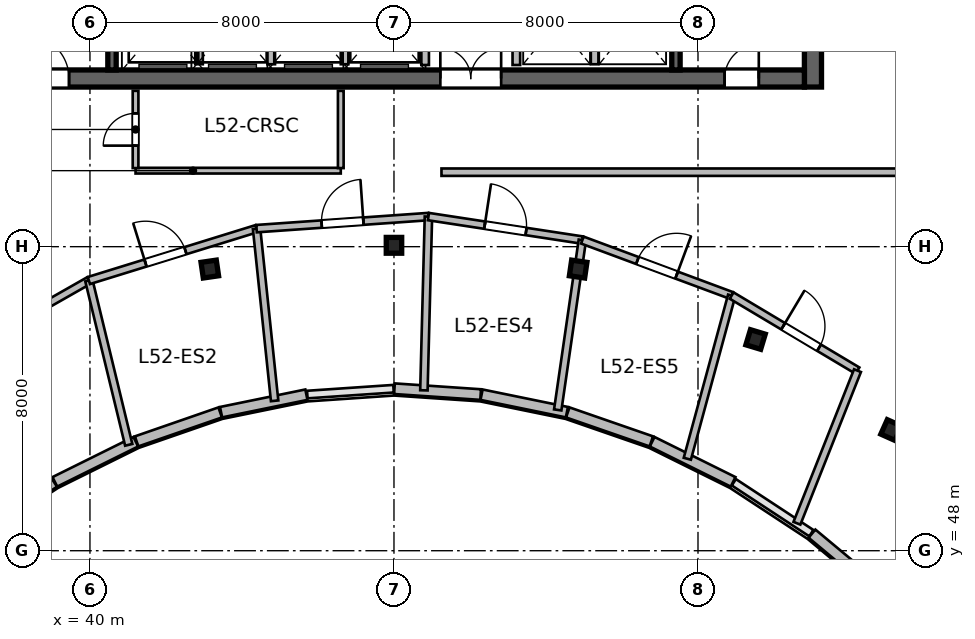
"""IFC4 building model, lengths in metres.
Left out: names, types, materials, properties, quantities, classifications, styles, units other than length and angle.
Written with IfcOpenShell. Run it as: python <this file> out.ifc"""

import sys

from ifc_helpers import new_model, si_unit, direction, frame, frame_2d, origin, origin_2d, place, context, subcontext, project, spatial, rectangle, i_section, extrude, source, transform, mapped, element, fill, save


model = new_model("IFC4")
c1 = context("Model", 3, precision=1e-05, world=origin(), true_north=direction((0.0, 1.0)))
c2 = subcontext(c1, "Body", "Model", "MODEL_VIEW")
j1 = project(units=[si_unit("LENGTHUNIT", "METRE"), si_unit("PLANEANGLEUNIT", "RADIAN")], contexts=[c1])
p1 = place(None, origin())
s1 = spatial("IfcSite", under=j1, at=p1, CompositionType="ELEMENT")
p2 = place(p1, origin())
s2 = spatial("IfcBuilding", under=s1, at=p2, CompositionType="ELEMENT")
p3 = place(p2, frame((0.0, 0.0, 215.7)))
s3 = spatial("IfcBuildingStorey", under=s2, at=p3, CompositionType="ELEMENT", Elevation=215.7)
m1 = source(origin(), c2, "Body", "SweptSolid", [
    extrude(rectangle(XDim=12.0, YDim=0.45, at=frame_2d((6.0, 0.0))), origin(), (0.0, 0.0, 1.0), 3.9),
])
p4 = place(p3, frame((59.025, 60.2, 0.0), z_axis=(0.0, 0.0, 1.0), x_axis=(0.0, 1.0, 0.0)))
e1 = element("IfcWall", 1, at=p4, inside=s3, PredefinedType="SHEAR", context=c2, shape_type="MappedRepresentation", body=[
    mapped(m1, transform((0.0, 0.0, 0.0), scale=1.0)),
])
m2 = source(origin(), c2, "Body", "SweptSolid", [
    extrude(rectangle(XDim=21.6, YDim=0.45, at=frame_2d((10.8, 0.0))), origin(), (0.0, 0.0, 1.0), 3.9),
])
p5 = place(p3, frame((37.2, 60.425, 0.0), z_axis=(0.0, 0.0, 1.0), x_axis=(1.0, 0.0, 0.0)))
e2 = element("IfcWall", 2, at=p5, inside=s3, PredefinedType="SHEAR", context=c2, shape_type="MappedRepresentation", body=[
    mapped(m2, transform((0.0, 0.0, 0.0), scale=1.0)),
])
p6 = place(p5, frame((1.1, 0.0, 0.0)))
e3 = element("IfcOpeningElement", 3, at=p6, cuts=e2, PredefinedType="OPENING", context=c2, shape_type="SweptSolid", body=[
    extrude(rectangle(XDim=1.15, YDim=2.15, at=frame_2d((0.575, 1.075))), frame((0.0, 0.235, 0.0), z_axis=(0.0, -1.0, 0.0), x_axis=(1.0, 0.0, 0.0)), (0.0, 0.0, 1.0), 0.47),
])
p7 = place(p5, frame((19.5, 0.0, 0.0)))
e4 = element("IfcOpeningElement", 4, at=p7, cuts=e2, PredefinedType="OPENING", context=c2, shape_type="SweptSolid", body=[
    extrude(rectangle(XDim=0.9, YDim=2.1, at=frame_2d((0.45, 1.05))), frame((0.0, 0.235, 0.0), z_axis=(0.0, -1.0, 0.0), x_axis=(1.0, 0.0, 0.0)), (0.0, 0.0, 1.0), 0.47),
])
p8 = place(p5, frame((12.02, 0.0, 0.0)))
e5 = element("IfcOpeningElement", 5, at=p8, cuts=e2, PredefinedType="OPENING", context=c2, shape_type="SweptSolid", body=[
    extrude(rectangle(XDim=1.6, YDim=2.15, at=frame_2d((0.8, 1.075))), frame((0.0, 0.235, 0.0), z_axis=(0.0, -1.0, 0.0), x_axis=(1.0, 0.0, 0.0)), (0.0, 0.0, 1.0), 0.47),
])
m3 = source(origin(), c2, "Body", "SweptSolid", [
    extrude(rectangle(XDim=11.1, YDim=0.22, at=frame_2d((5.55, 0.0))), origin(), (0.0, 0.0, 1.0), 3.9),
])
p9 = place(p3, frame((40.58, 60.65, 0.0), z_axis=(0.0, 0.0, 1.0), x_axis=(0.0, 1.0, 0.0)))
e6 = element("IfcWall", 6, at=p9, inside=s3, PredefinedType="SHEAR", context=c2, shape_type="MappedRepresentation", body=[
    mapped(m3, transform((0.0, 0.0, 0.0), scale=1.0)),
])
p10 = place(p3, frame((55.42, 60.65, 0.0), z_axis=(0.0, 0.0, 1.0), x_axis=(0.0, 1.0, 0.0)))
e7 = element("IfcWall", 7, at=p10, inside=s3, PredefinedType="SHEAR", context=c2, shape_type="MappedRepresentation", body=[
    mapped(m3, transform((0.0, 0.0, 0.0), scale=1.0)),
])
p11 = place(p10, frame((9.595, 0.0, 0.0)))
e8 = element("IfcOpeningElement", 8, at=p11, cuts=e7, PredefinedType="OPENING", context=c2, shape_type="SweptSolid", body=[
    extrude(rectangle(XDim=1.15, YDim=2.15, at=frame_2d((0.575, 1.075))), frame((0.0, 0.12, 0.0), z_axis=(0.0, -1.0, 0.0), x_axis=(1.0, 0.0, 0.0)), (0.0, 0.0, 1.0), 0.24),
])
m4 = source(origin(), c2, "Body", "SweptSolid", [
    extrude(i_section(OverallWidth=0.406, OverallDepth=0.416, WebThickness=0.03, FlangeThickness=0.048, at=origin_2d()), origin(), (0.0, 0.0, 1.0), 3.9),
])
for number, where, z_axis, x_axis in (
    (9, (43.154, 55.411, 0.0), (0.0, 0.0, 1.0), (-0.143, 0.99, 0.0)),
    (10, (48.0, 56.036, 0.0), (0.0, 0.0, 1.0), (0.0, 1.0, 0.0)),
    (11, (52.846, 55.411, 0.0), (0.0, 0.0, 1.0), (0.143, 0.99, 0.0)),
    (12, (57.515, 53.558, 0.0), (0.0, 0.0, 1.0), (0.289, 0.957, 0.0)),
    (13, (61.082, 51.175, 0.0), (0.0, 0.0, 1.0), (0.409, 0.912, 0.0)),
):
    element("IfcColumn", number, at=place(p3, frame(where, z_axis=z_axis, x_axis=x_axis)), inside=s3, PredefinedType="COLUMN", context=c2, shape_type="MappedRepresentation", body=[
        mapped(m4, transform((0.0, 0.0, 0.0), scale=1.0)),
    ])
m5 = source(origin(), c2, "Body", "SweptSolid", [
    extrude(rectangle(XDim=2.511, YDim=0.28, at=frame_2d((1.256, 0.0))), origin(), (0.0, 0.0, 1.0), 3.64),
])
p12 = place(p3, frame((60.928, 46.841, 0.0), z_axis=(0.0, 0.0, 1.0), x_axis=(-0.767910416122, 0.640557251782, 0.0)))
e14 = element("IfcWall", 14, at=p12, inside=s3, PredefinedType="SOLIDWALL", context=c2, shape_type="MappedRepresentation", body=[
    mapped(m5, transform((0.0, 0.0, 0.0), scale=1.0)),
])
m6 = source(origin(), c2, "Body", "SweptSolid", [
    extrude(rectangle(XDim=2.378, YDim=0.28, at=frame_2d((1.189, 0.0))), origin(), (0.0, 0.0, 1.0), 3.64),
])
p13 = place(p3, frame((56.924, 49.812, 0.0), z_axis=(0.0, 0.0, 1.0), x_axis=(-0.895941616831, 0.444171835252, 0.0)))
e15 = element("IfcWall", 15, at=p13, inside=s3, PredefinedType="SOLIDWALL", context=c2, shape_type="MappedRepresentation", body=[
    mapped(m6, transform((0.0, 0.0, 0.0), scale=1.0)),
])
m7 = source(origin(), c2, "Body", "SweptSolid", [
    extrude(rectangle(XDim=2.328, YDim=0.28, at=frame_2d((1.164, 0.0))), origin(), (0.0, 0.0, 1.0), 3.64),
])
p14 = place(p3, frame((54.772, 50.876, 0.0), z_axis=(0.0, 0.0, 1.0), x_axis=(-0.944872545641, 0.32743834915, 0.0)))
e16 = element("IfcWall", 16, at=p14, inside=s3, PredefinedType="SOLIDWALL", context=c2, shape_type="MappedRepresentation", body=[
    mapped(m7, transform((0.0, 0.0, 0.0), scale=1.0)),
])
m8 = source(origin(), c2, "Body", "SweptSolid", [
    extrude(rectangle(XDim=2.292, YDim=0.28, at=frame_2d((1.146, 0.0))), origin(), (0.0, 0.0, 1.0), 3.64),
])
p15 = place(p3, frame((52.55, 51.645, 0.0), z_axis=(0.0, 0.0, 1.0), x_axis=(-0.979635482689, 0.200784264963, 0.0)))
e17 = element("IfcWall", 17, at=p15, inside=s3, PredefinedType="SOLIDWALL", context=c2, shape_type="MappedRepresentation", body=[
    mapped(m8, transform((0.0, 0.0, 0.0), scale=1.0)),
])
m9 = source(origin(), c2, "Body", "SweptSolid", [
    extrude(rectangle(XDim=2.274, YDim=0.28, at=frame_2d((1.137, 0.0))), origin(), (0.0, 0.0, 1.0), 3.64),
])
p16 = place(p3, frame((50.281, 52.109, 0.0), z_axis=(0.0, 0.0, 1.0), x_axis=(-0.997702696995, 0.067744582138, 0.0)))
e18 = element("IfcWall", 18, at=p16, inside=s3, PredefinedType="SOLIDWALL", context=c2, shape_type="MappedRepresentation", body=[
    mapped(m9, transform((0.0, 0.0, 0.0), scale=1.0)),
])
p17 = place(p3, frame((45.695, 52.105, 0.0), z_axis=(0.0, 0.0, 1.0), x_axis=(-0.979635482689, -0.200784264963, 0.0)))
e19 = element("IfcWall", 19, at=p17, inside=s3, PredefinedType="SOLIDWALL", context=c2, shape_type="MappedRepresentation", body=[
    mapped(m8, transform((0.0, 0.0, 0.0), scale=1.0)),
])
p18 = place(p3, frame((43.427, 51.639, 0.0), z_axis=(0.0, 0.0, 1.0), x_axis=(-0.944872545641, -0.32743834915, 0.0)))
e20 = element("IfcWall", 20, at=p18, inside=s3, PredefinedType="SOLIDWALL", context=c2, shape_type="MappedRepresentation", body=[
    mapped(m7, transform((0.0, 0.0, 0.0), scale=1.0)),
])
p19 = place(p3, frame((41.207, 50.868, 0.0), z_axis=(0.0, 0.0, 1.0), x_axis=(-0.895941616831, -0.444171835252, 0.0)))
e21 = element("IfcWall", 21, at=p19, inside=s3, PredefinedType="SOLIDWALL", context=c2, shape_type="MappedRepresentation", body=[
    mapped(m6, transform((0.0, 0.0, 0.0), scale=1.0)),
])
m10 = source(origin(), c2, "Body", "SweptSolid", [
    extrude(rectangle(XDim=2.44, YDim=0.28, at=frame_2d((1.22, 0.0))), origin(), (0.0, 0.0, 1.0), 3.64),
])
p20 = place(p3, frame((39.057, 49.801, 0.0), z_axis=(0.0, 0.0, 1.0), x_axis=(-0.83598480459, -0.548752591333, 0.0)))
e22 = element("IfcWall", 22, at=p20, inside=s3, PredefinedType="SOLIDWALL", context=c2, shape_type="MappedRepresentation", body=[
    mapped(m10, transform((0.0, 0.0, 0.0), scale=1.0)),
])
m11 = source(origin(), c2, "Body", "SweptSolid", [
    extrude(rectangle(XDim=2.24, YDim=0.2, at=frame_2d((1.12, 0.0))), origin(), (0.0, 0.0, 1.0), 3.64),
])
for number, where, z_axis, x_axis in (
    (23, (48.82, 60.78, 0.0), (0.0, 0.0, 1.0), (0.0, 1.0, 0.0)),
    (24, (51.22, 60.78, 0.0), (0.0, 0.0, 1.0), (0.0, 1.0, 0.0)),
):
    element("IfcWall", number, at=place(p3, frame(where, z_axis=z_axis, x_axis=x_axis)), inside=s3, PredefinedType="SOLIDWALL", context=c2, shape_type="MappedRepresentation", body=[
        mapped(m11, transform((0.0, 0.0, 0.0), scale=1.0)),
    ])
m12 = source(origin(), c2, "Body", "SweptSolid", [
    extrude(rectangle(XDim=2.2, YDim=0.2, at=frame_2d((1.1, 0.0))), origin(), (0.0, 0.0, 1.0), 3.64),
])
for number, where, z_axis, x_axis in (
    (25, (42.87, 60.8, 0.0), (0.0, 0.0, 1.0), (0.0, 1.0, 0.0)),
    (26, (44.77, 60.8, 0.0), (0.0, 0.0, 1.0), (0.0, 1.0, 0.0)),
    (27, (46.7, 60.8, 0.0), (0.0, 0.0, 1.0), (0.0, 1.0, 0.0)),
    (28, (53.28, 60.8, 0.0), (0.0, 0.0, 1.0), (0.0, 1.0, 0.0)),
):
    element("IfcWall", number, at=place(p3, frame(where, z_axis=z_axis, x_axis=x_axis)), inside=s3, PredefinedType="SOLIDWALL", context=c2, shape_type="MappedRepresentation", body=[
        mapped(m12, transform((0.0, 0.0, 0.0), scale=1.0)),
    ])
m13 = source(origin(), c2, "Body", "SweptSolid", [
    extrude(rectangle(XDim=5.4, YDim=0.15, at=frame_2d((2.7, 0.0))), origin(), (0.0, 0.0, 1.0), 3.64),
])
p21 = place(p3, frame((41.2, 58.0, 0.0), z_axis=(0.0, 0.0, 1.0), x_axis=(1.0, 0.0, 0.0)))
e29 = element("IfcWall", 29, at=p21, inside=s3, PredefinedType="PARTITIONING", context=c2, shape_type="MappedRepresentation", body=[
    mapped(m13, transform((0.0, 0.0, 0.0), scale=1.0)),
])
m14 = source(origin(), c2, "Body", "SweptSolid", [
    extrude(rectangle(XDim=2.033, YDim=0.15, at=frame_2d((1.016, 0.0))), origin(), (0.0, 0.0, 1.0), 3.64),
])
p22 = place(p3, frame((41.2, 58.067, 0.0), z_axis=(0.0, 0.0, 1.0), x_axis=(0.0, 1.0, 0.0)))
e30 = element("IfcWall", 30, at=p22, inside=s3, PredefinedType="PARTITIONING", context=c2, shape_type="MappedRepresentation", body=[
    mapped(m14, transform((0.0, 0.0, 0.0), scale=1.0)),
])
p23 = place(p22, frame((0.591, 0.0, 0.0)))
e31 = element("IfcOpeningElement", 31, at=p23, cuts=e30, PredefinedType="OPENING", context=c2, shape_type="SweptSolid", body=[
    extrude(rectangle(XDim=0.85, YDim=2.1, at=frame_2d((0.425, 1.05))), frame((0.0, 0.085, 0.0), z_axis=(0.0, -1.0, 0.0), x_axis=(1.0, 0.0, 0.0)), (0.0, 0.0, 1.0), 0.17),
])
p24 = place(p3, frame((46.6, 58.067, 0.0), z_axis=(0.0, 0.0, 1.0), x_axis=(0.0, 1.0, 0.0)))
e32 = element("IfcWall", 32, at=p24, inside=s3, PredefinedType="PARTITIONING", context=c2, shape_type="MappedRepresentation", body=[
    mapped(m14, transform((0.0, 0.0, 0.0), scale=1.0)),
])
m15 = source(origin(), c2, "Body", "SweptSolid", [
    extrude(rectangle(XDim=4.796, YDim=0.195, at=frame_2d((2.398, 0.0))), origin(), (0.0, 0.0, 1.0), 3.64),
])
p25 = place(p3, frame((35.803, 52.738, 0.0), z_axis=(0.0, 0.0, 1.0), x_axis=(0.869231352707, 0.494405557686, 0.0)))
e33 = element("IfcWall", 33, at=p25, inside=s3, PredefinedType="PARTITIONING", context=c2, shape_type="MappedRepresentation", body=[
    mapped(m15, transform((0.0, 0.0, 0.0), scale=1.0)),
])
p26 = place(p25, frame((1.098, 0.0, 0.0)))
e34 = element("IfcOpeningElement", 34, at=p26, cuts=e33, PredefinedType="OPENING", context=c2, shape_type="SweptSolid", body=[
    extrude(rectangle(XDim=1.1, YDim=2.15, at=frame_2d((0.55, 1.075))), frame((0.0, 0.107, 0.0), z_axis=(0.0, -1.0, 0.0), x_axis=(1.0, 0.0, 0.0)), (0.0, 0.0, 1.0), 0.215),
])
m16 = source(origin(), c2, "Body", "SweptSolid", [
    extrude(rectangle(XDim=4.448, YDim=0.195, at=frame_2d((2.224, 0.0))), origin(), (0.0, 0.0, 1.0), 3.64),
])
p27 = place(p3, frame((41.02, 50.786, 0.0), z_axis=(0.0, 0.0, 1.0), x_axis=(-0.235672283469, 0.971832585791, 0.0)))
e35 = element("IfcWall", 35, at=p27, inside=s3, PredefinedType="PARTITIONING", context=c2, shape_type="MappedRepresentation", body=[
    mapped(m16, transform((0.0, 0.0, 0.0), scale=1.0)),
])
m17 = source(origin(), c2, "Body", "SweptSolid", [
    extrude(rectangle(XDim=4.619, YDim=0.195, at=frame_2d((2.31, 0.0))), origin(), (0.0, 0.0, 1.0), 3.64),
])
p28 = place(p3, frame((39.972, 55.109, 0.0), z_axis=(0.0, 0.0, 1.0), x_axis=(0.955335644135, 0.295522938274, 0.0)))
e36 = element("IfcWall", 36, at=p28, inside=s3, PredefinedType="PARTITIONING", context=c2, shape_type="MappedRepresentation", body=[
    mapped(m17, transform((0.0, 0.0, 0.0), scale=1.0)),
])
p29 = place(p28, frame((1.56, 0.0, 0.0)))
e37 = element("IfcOpeningElement", 37, at=p29, cuts=e36, PredefinedType="OPENING", context=c2, shape_type="SweptSolid", body=[
    extrude(rectangle(XDim=1.1, YDim=2.15, at=frame_2d((0.55, 1.075))), frame((0.0, 0.107, 0.0), z_axis=(0.0, -1.0, 0.0), x_axis=(1.0, 0.0, 0.0)), (0.0, 0.0, 1.0), 0.215),
])
m18 = source(origin(), c2, "Body", "SweptSolid", [
    extrude(rectangle(XDim=4.555, YDim=0.195, at=frame_2d((2.278, 0.0))), origin(), (0.0, 0.0, 1.0), 3.64),
])
p30 = place(p3, frame((44.859, 51.944, 0.0), z_axis=(0.0, 0.0, 1.0), x_axis=(-0.104299759329, 0.994545906534, 0.0)))
e38 = element("IfcWall", 38, at=p30, inside=s3, PredefinedType="PARTITIONING", context=c2, shape_type="MappedRepresentation", body=[
    mapped(m18, transform((0.0, 0.0, 0.0), scale=1.0)),
])
m19 = source(origin(), c2, "Body", "SweptSolid", [
    extrude(rectangle(XDim=4.534, YDim=0.195, at=frame_2d((2.267, 0.0))), origin(), (0.0, 0.0, 1.0), 3.64),
])
p31 = place(p3, frame((44.384, 56.474, 0.0), z_axis=(0.0, 0.0, 1.0), x_axis=(0.997542735031, 0.070060629361, 0.0)))
e39 = element("IfcWall", 39, at=p31, inside=s3, PredefinedType="PARTITIONING", context=c2, shape_type="MappedRepresentation", body=[
    mapped(m19, transform((0.0, 0.0, 0.0), scale=1.0)),
])
p32 = place(p31, frame((1.717, 0.0, 0.0)))
e40 = element("IfcOpeningElement", 40, at=p32, cuts=e39, PredefinedType="OPENING", context=c2, shape_type="SweptSolid", body=[
    extrude(rectangle(XDim=1.1, YDim=2.15, at=frame_2d((0.55, 1.075))), frame((0.0, 0.107, 0.0), z_axis=(0.0, -1.0, 0.0), x_axis=(1.0, 0.0, 0.0)), (0.0, 0.0, 1.0), 0.215),
])
m20 = source(origin(), c2, "Body", "SweptSolid", [
    extrude(rectangle(XDim=4.573, YDim=0.195, at=frame_2d((2.287, 0.0))), origin(), (0.0, 0.0, 1.0), 3.64),
])
p33 = place(p3, frame((48.788, 52.22, 0.0), z_axis=(0.0, 0.0, 1.0), x_axis=(0.026049788838, 0.99966064667, 0.0)))
e41 = element("IfcWall", 41, at=p33, inside=s3, PredefinedType="PARTITIONING", context=c2, shape_type="MappedRepresentation", body=[
    mapped(m20, transform((0.0, 0.0, 0.0), scale=1.0)),
])
m21 = source(origin(), c2, "Body", "SweptSolid", [
    extrude(rectangle(XDim=4.097, YDim=0.195, at=frame_2d((2.049, 0.0))), origin(), (0.0, 0.0, 1.0), 3.64),
])
p34 = place(p3, frame((48.907, 56.792, 0.0), z_axis=(0.0, 0.0, 1.0), x_axis=(0.988545320847, -0.150924314249, 0.0)))
e42 = element("IfcWall", 42, at=p34, inside=s3, PredefinedType="PARTITIONING", context=c2, shape_type="MappedRepresentation", body=[
    mapped(m21, transform((0.0, 0.0, 0.0), scale=1.0)),
])
p35 = place(p34, frame((1.499, 0.0, 0.0)))
e43 = element("IfcOpeningElement", 43, at=p35, cuts=e42, PredefinedType="OPENING", context=c2, shape_type="SweptSolid", body=[
    extrude(rectangle(XDim=1.1, YDim=2.15, at=frame_2d((0.55, 1.075))), frame((0.0, 0.107, 0.0), z_axis=(0.0, -1.0, 0.0), x_axis=(1.0, 0.0, 0.0)), (0.0, 0.0, 1.0), 0.215),
])
m22 = source(origin(), c2, "Body", "SweptSolid", [
    extrude(rectangle(XDim=4.516, YDim=0.195, at=frame_2d((2.258, 0.0))), origin(), (0.0, 0.0, 1.0), 3.085),
])
p36 = place(p3, frame((52.309, 51.705, 0.0), z_axis=(0.0, 0.0, 1.0), x_axis=(0.143540347267, 0.989644465809, 0.0)))
e44 = element("IfcWall", 44, at=p36, inside=s3, PredefinedType="PARTITIONING", context=c2, shape_type="MappedRepresentation", body=[
    mapped(m22, transform((0.0, 0.0, 0.0), scale=1.0)),
])
m23 = source(origin(), c2, "Body", "SweptSolid", [
    extrude(rectangle(XDim=4.191, YDim=0.195, at=frame_2d((2.095, 0.0))), origin(), (0.0, 0.0, 1.0), 3.64),
])
p37 = place(p3, frame((52.957, 56.174, 0.0), z_axis=(0.0, 0.0, 1.0), x_axis=(0.937361695407, -0.348357649527, 0.0)))
e45 = element("IfcWall", 45, at=p37, inside=s3, PredefinedType="PARTITIONING", context=c2, shape_type="MappedRepresentation", body=[
    mapped(m23, transform((0.0, 0.0, 0.0), scale=1.0)),
])
p38 = place(p37, frame((1.545, 0.0, 0.0)))
e46 = element("IfcOpeningElement", 46, at=p38, cuts=e45, PredefinedType="OPENING", context=c2, shape_type="SweptSolid", body=[
    extrude(rectangle(XDim=1.1, YDim=2.15, at=frame_2d((0.55, 1.075))), frame((0.0, 0.107, 0.0), z_axis=(0.0, -1.0, 0.0), x_axis=(1.0, 0.0, 0.0)), (0.0, 0.0, 1.0), 0.215),
])
m24 = source(origin(), c2, "Body", "SweptSolid", [
    extrude(rectangle(XDim=4.449, YDim=0.195, at=frame_2d((2.225, 0.0))), origin(), (0.0, 0.0, 1.0), 3.64),
])
p39 = place(p3, frame((55.719, 50.42, 0.0), z_axis=(0.0, 0.0, 1.0), x_axis=(0.262123660516, 0.965034292965, 0.0)))
e47 = element("IfcWall", 47, at=p39, inside=s3, PredefinedType="PARTITIONING", context=c2, shape_type="MappedRepresentation", body=[
    mapped(m24, transform((0.0, 0.0, 0.0), scale=1.0)),
])
m25 = source(origin(), c2, "Body", "SweptSolid", [
    extrude(rectangle(XDim=3.856, YDim=0.195, at=frame_2d((1.928, 0.0))), origin(), (0.0, 0.0, 1.0), 3.64),
])
p40 = place(p3, frame((56.886, 54.714, 0.0), z_axis=(0.0, 0.0, 1.0), x_axis=(0.858797511375, -0.512315171019, 0.0)))
e48 = element("IfcWall", 48, at=p40, inside=s3, PredefinedType="PARTITIONING", context=c2, shape_type="MappedRepresentation", body=[
    mapped(m25, transform((0.0, 0.0, 0.0), scale=1.0)),
])
p41 = place(p40, frame((1.578, 0.0, 0.0)))
e49 = element("IfcOpeningElement", 49, at=p41, cuts=e48, PredefinedType="OPENING", context=c2, shape_type="SweptSolid", body=[
    extrude(rectangle(XDim=1.1, YDim=2.15, at=frame_2d((0.55, 1.075))), frame((0.0, 0.107, 0.0), z_axis=(0.0, -1.0, 0.0), x_axis=(1.0, 0.0, 0.0)), (0.0, 0.0, 1.0), 0.215),
])
m26 = source(origin(), c2, "Body", "SweptSolid", [
    extrude(rectangle(XDim=4.32, YDim=0.195, at=frame_2d((2.16, 0.0))), origin(), (0.0, 0.0, 1.0), 3.64),
])
p42 = place(p3, frame((58.604, 48.723, 0.0), z_axis=(0.0, 0.0, 1.0), x_axis=(0.368846295269, 0.929490403644, 0.0)))
e50 = element("IfcWall", 50, at=p42, inside=s3, PredefinedType="PARTITIONING", context=c2, shape_type="MappedRepresentation", body=[
    mapped(m26, transform((0.0, 0.0, 0.0), scale=1.0)),
])
m27 = source(origin(), c2, "Body", "SweptSolid", [
    extrude(rectangle(XDim=12.39, YDim=0.195, at=frame_2d((6.195, 0.0))), origin(), (0.0, 0.0, 1.0), 3.64),
])
p43 = place(p3, frame((49.25, 57.96, 0.0), z_axis=(0.0, 0.0, 1.0), x_axis=(1.0, 0.0, 0.0)))
e51 = element("IfcWall", 51, at=p43, inside=s3, PredefinedType="PARTITIONING", context=c2, shape_type="MappedRepresentation", body=[
    mapped(m27, transform((0.0, 0.0, 0.0), scale=1.0)),
])
m28 = source(origin(), c2, "Body", "SweptSolid", [
    extrude(rectangle(XDim=1.15, YDim=2.15, at=frame_2d((0.575, 1.075))), frame((0.0, 0.025, 0.0), z_axis=(0.0, -1.0, 0.0), x_axis=(1.0, 0.0, 0.0)), (0.0, 0.0, 1.0), 0.05),
])
p44 = place(p6, origin())
e52 = element("IfcDoor", 52, at=p44, inside=s3, OperationType="SINGLE_SWING_LEFT", PredefinedType="DOOR", context=c2, shape_type="MappedRepresentation", body=[
    mapped(m28, transform((0.0, 0.0, 0.0), scale=1.0)),
])
fill(e3, e52)
m29 = source(origin(), c2, "Body", "SweptSolid", [
    extrude(rectangle(XDim=0.9, YDim=2.1, at=frame_2d((0.45, 1.05))), frame((0.0, 0.025, 0.0), z_axis=(0.0, -1.0, 0.0), x_axis=(1.0, 0.0, 0.0)), (0.0, 0.0, 1.0), 0.05),
])
p45 = place(p7, origin())
e53 = element("IfcDoor", 53, at=p45, inside=s3, OperationType="SINGLE_SWING_RIGHT", PredefinedType="DOOR", context=c2, shape_type="MappedRepresentation", body=[
    mapped(m29, transform((0.0, 0.0, 0.0), scale=1.0)),
])
fill(e4, e53)
m30 = source(origin(), c2, "Body", "SweptSolid", [
    extrude(rectangle(XDim=1.6, YDim=2.15, at=frame_2d((0.8, 1.075))), frame((0.0, 0.025, 0.0), z_axis=(0.0, -1.0, 0.0), x_axis=(1.0, 0.0, 0.0)), (0.0, 0.0, 1.0), 0.05),
])
p46 = place(p8, origin())
e54 = element("IfcDoor", 54, at=p46, inside=s3, OperationType="DOUBLE_DOOR_SINGLE_SWING", PredefinedType="DOOR", context=c2, shape_type="MappedRepresentation", body=[
    mapped(m30, transform((0.0, 0.0, 0.0), scale=1.0)),
])
fill(e5, e54)
m31 = source(origin(), c2, "Body", "SweptSolid", [
    extrude(rectangle(XDim=0.85, YDim=2.1, at=frame_2d((0.425, 1.05))), frame((0.0, 0.025, 0.0), z_axis=(0.0, -1.0, 0.0), x_axis=(1.0, 0.0, 0.0)), (0.0, 0.0, 1.0), 0.05),
])
p47 = place(p23, origin())
e55 = element("IfcDoor", 55, at=p47, inside=s3, OperationType="SINGLE_SWING_LEFT", PredefinedType="DOOR", context=c2, shape_type="MappedRepresentation", body=[
    mapped(m31, transform((0.0, 0.0, 0.0), scale=1.0)),
])
fill(e31, e55)
m32 = source(origin(), c2, "Body", "SweptSolid", [
    extrude(rectangle(XDim=1.1, YDim=2.15, at=frame_2d((0.55, 1.075))), frame((0.0, 0.025, 0.0), z_axis=(0.0, -1.0, 0.0), x_axis=(1.0, 0.0, 0.0)), (0.0, 0.0, 1.0), 0.05),
])
p48 = place(p29, origin())
e56 = element("IfcDoor", 56, at=p48, inside=s3, OperationType="SINGLE_SWING_LEFT", PredefinedType="DOOR", context=c2, shape_type="MappedRepresentation", body=[
    mapped(m32, transform((0.0, 0.0, 0.0), scale=1.0)),
])
fill(e37, e56)
p49 = place(p32, origin())
e57 = element("IfcDoor", 57, at=p49, inside=s3, OperationType="SINGLE_SWING_RIGHT", PredefinedType="DOOR", context=c2, shape_type="MappedRepresentation", body=[
    mapped(m32, transform((0.0, 0.0, 0.0), scale=1.0)),
])
fill(e40, e57)
p50 = place(p35, origin())
e58 = element("IfcDoor", 58, at=p50, inside=s3, OperationType="SINGLE_SWING_LEFT", PredefinedType="DOOR", context=c2, shape_type="MappedRepresentation", body=[
    mapped(m32, transform((0.0, 0.0, 0.0), scale=1.0)),
])
fill(e43, e58)
p51 = place(p38, origin())
e59 = element("IfcDoor", 59, at=p51, inside=s3, OperationType="SINGLE_SWING_RIGHT", PredefinedType="DOOR", context=c2, shape_type="MappedRepresentation", body=[
    mapped(m32, transform((0.0, 0.0, 0.0), scale=1.0)),
])
fill(e46, e59)
p52 = place(p41, origin())
e60 = element("IfcDoor", 60, at=p52, inside=s3, OperationType="SINGLE_SWING_LEFT", PredefinedType="DOOR", context=c2, shape_type="MappedRepresentation", body=[
    mapped(m32, transform((0.0, 0.0, 0.0), scale=1.0)),
])
fill(e49, e60)
save(model, sys.argv[1])
